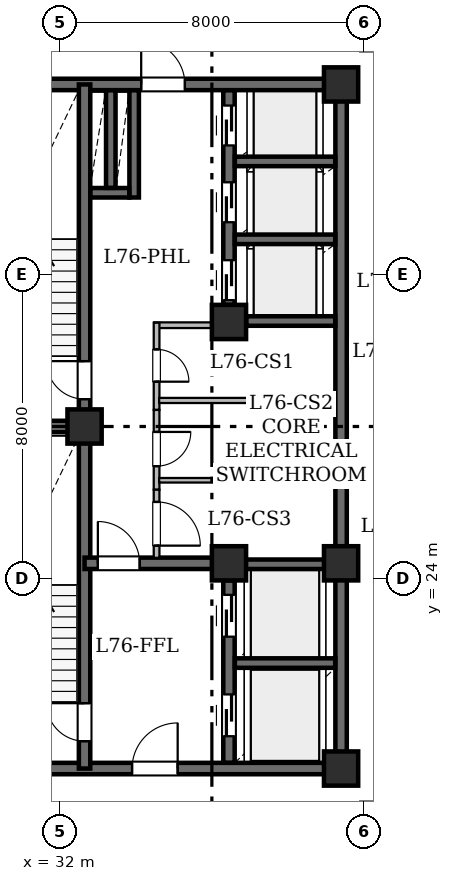
"""IFC4 building model, lengths in metres.
Left out: names, types, materials, properties, quantities, classifications, styles, units other than length and angle.
Written with IfcOpenShell. Run it as: python <this file> out.ifc"""

import sys

from ifc_helpers import new_model, si_unit, direction, frame, frame_2d, origin, origin_2d, place, context, subcontext, project, spatial, rectangle, hollow_rectangle, extrude, element, fill, save


model = new_model("IFC4")
c1 = context("Model", 3, precision=1e-05, world=origin(), true_north=direction((0.0, 1.0)))
c2 = subcontext(c1, "Body", "Model", "MODEL_VIEW")
j1 = project(units=[si_unit("LENGTHUNIT", "METRE"), si_unit("PLANEANGLEUNIT", "RADIAN")], contexts=[c1])
p1 = place(None, origin())
s1 = spatial("IfcSite", under=j1, at=p1, CompositionType="ELEMENT")
p2 = place(p1, origin())
s2 = spatial("IfcBuilding", under=s1, at=p2, CompositionType="ELEMENT")
p3 = place(p2, frame((0.0, 0.0, 298.85)))
s3 = spatial("IfcBuildingStorey", under=s2, at=p3, CompositionType="ELEMENT", Elevation=298.85)
for number, where, z_axis, x_axis in (
    (1, (32.65, 28.0, 0.0), (0.0, 0.0, 1.0), (1.0, 0.0, 0.0)),
    (2, (39.4, 19.0, 0.0), (0.0, 0.0, 1.0), (1.0, 0.0, 0.0)),
    (3, (36.45, 24.4, 0.0), (0.0, 0.0, 1.0), (1.0, 0.0, 0.0)),
    (4, (39.4, 24.4, 0.0), (0.0, 0.0, 1.0), (1.0, 0.0, 0.0)),
    (5, (36.45, 30.75, 0.0), (0.0, 0.0, 1.0), (1.0, 0.0, 0.0)),
    (6, (39.4, 37.0, 0.0), (0.0, 0.0, 1.0), (1.0, 0.0, 0.0)),
):
    element("IfcColumn", number, at=place(p3, frame(where, z_axis=z_axis, x_axis=x_axis)), inside=s3, PredefinedType="COLUMN", context=c2, shape_type="SweptSolid", body=[
        extrude(hollow_rectangle(XDim=0.9, YDim=0.9, WallThickness=0.045, at=origin_2d()), origin(), (0.0, 0.0, 1.0), 4.2),
    ])
p4 = place(p3, frame((29.0, 19.0, 0.0), z_axis=(0.0, 0.0, 1.0), x_axis=(1.0, 0.0, 0.0)))
e7 = element("IfcWall", 7, at=p4, inside=s3, PredefinedType="SHEAR", context=c2, shape_type="SweptSolid", body=[
    extrude(rectangle(XDim=10.4, YDim=0.3, at=frame_2d((5.2, 0.0))), origin(), (0.0, 0.0, 1.0), 3.88),
])
p5 = place(p4, frame((4.9, 0.0, 0.0)))
e8 = element("IfcOpeningElement", 8, at=p5, cuts=e7, PredefinedType="OPENING", context=c2, shape_type="SweptSolid", body=[
    extrude(rectangle(XDim=1.2, YDim=2.15, at=frame_2d((0.6, 1.075))), frame((0.0, 0.16, 0.0), z_axis=(0.0, -1.0, 0.0), x_axis=(1.0, 0.0, 0.0)), (0.0, 0.0, 1.0), 0.32),
])
p6 = place(p3, frame((29.0, 37.0, 0.0), z_axis=(0.0, 0.0, 1.0), x_axis=(1.0, 0.0, 0.0)))
e9 = element("IfcWall", 9, at=p6, inside=s3, PredefinedType="SHEAR", context=c2, shape_type="SweptSolid", body=[
    extrude(rectangle(XDim=10.4, YDim=0.3, at=frame_2d((5.2, 0.0))), origin(), (0.0, 0.0, 1.0), 3.88),
])
p7 = place(p6, frame((5.14, 0.0, 0.0)))
e10 = element("IfcOpeningElement", 10, at=p7, cuts=e9, PredefinedType="OPENING", context=c2, shape_type="SweptSolid", body=[
    extrude(rectangle(XDim=1.15, YDim=2.2, at=frame_2d((0.575, 1.1))), frame((0.0, 0.16, 0.0), z_axis=(0.0, -1.0, 0.0), x_axis=(1.0, 0.0, 0.0)), (0.0, 0.0, 1.0), 0.32),
])
p8 = place(p3, frame((39.4, 19.0, 0.0), z_axis=(0.0, 0.0, 1.0), x_axis=(0.0, 1.0, 0.0)))
e11 = element("IfcWall", 11, at=p8, inside=s3, PredefinedType="SHEAR", context=c2, shape_type="SweptSolid", body=[
    extrude(rectangle(XDim=5.4, YDim=0.3, at=frame_2d((2.7, 0.0))), origin(), (0.0, 0.0, 1.0), 3.88),
])
p9 = place(p3, frame((39.4, 24.4, 0.0), z_axis=(0.0, 0.0, 1.0), x_axis=(0.0, 1.0, 0.0)))
e12 = element("IfcWall", 12, at=p9, inside=s3, PredefinedType="SHEAR", context=c2, shape_type="SweptSolid", body=[
    extrude(rectangle(XDim=12.6, YDim=0.3, at=frame_2d((6.3, 0.0))), origin(), (0.0, 0.0, 1.0), 3.88),
])
p10 = place(p3, frame((32.65, 19.0, 0.0), z_axis=(0.0, 0.0, 1.0), x_axis=(0.0, 1.0, 0.0)))
e13 = element("IfcWall", 13, at=p10, inside=s3, PredefinedType="SHEAR", context=c2, shape_type="SweptSolid", body=[
    extrude(rectangle(XDim=9.0, YDim=0.3, at=frame_2d((4.5, 0.0))), origin(), (0.0, 0.0, 1.0), 3.88),
])
p11 = place(p10, frame((0.72, 0.0, 0.0)))
e14 = element("IfcOpeningElement", 14, at=p11, cuts=e13, PredefinedType="OPENING", context=c2, shape_type="SweptSolid", body=[
    extrude(rectangle(XDim=1.0, YDim=2.15, at=frame_2d((0.5, 1.075))), frame((0.0, 0.16, 0.0), z_axis=(0.0, -1.0, 0.0), x_axis=(1.0, 0.0, 0.0)), (0.0, 0.0, 1.0), 0.32),
])
p12 = place(p3, frame((32.65, 28.0, 0.0), z_axis=(0.0, 0.0, 1.0), x_axis=(0.0, 1.0, 0.0)))
e15 = element("IfcWall", 15, at=p12, inside=s3, PredefinedType="SHEAR", context=c2, shape_type="SweptSolid", body=[
    extrude(rectangle(XDim=9.0, YDim=0.3, at=frame_2d((4.5, 0.0))), origin(), (0.0, 0.0, 1.0), 3.88),
])
p13 = place(p12, frame((0.72, 0.0, 0.0)))
e16 = element("IfcOpeningElement", 16, at=p13, cuts=e15, PredefinedType="OPENING", context=c2, shape_type="SweptSolid", body=[
    extrude(rectangle(XDim=1.0, YDim=2.15, at=frame_2d((0.5, 1.075))), frame((0.0, 0.16, 0.0), z_axis=(0.0, -1.0, 0.0), x_axis=(1.0, 0.0, 0.0)), (0.0, 0.0, 1.0), 0.32),
])
p14 = place(p3, frame((29.0, 28.0, 0.0), z_axis=(0.0, 0.0, 1.0), x_axis=(1.0, 0.0, 0.0)))
e17 = element("IfcWall", 17, at=p14, inside=s3, PredefinedType="SHEAR", context=c2, shape_type="SweptSolid", body=[
    extrude(rectangle(XDim=3.65, YDim=0.3, at=frame_2d((1.825, 0.0))), origin(), (0.0, 0.0, 1.0), 3.88),
])
p15 = place(p3, frame((32.65, 24.4, 0.0), z_axis=(0.0, 0.0, 1.0), x_axis=(1.0, 0.0, 0.0)))
e18 = element("IfcWall", 18, at=p15, inside=s3, PredefinedType="SHEAR", context=c2, shape_type="SweptSolid", body=[
    extrude(rectangle(XDim=3.8, YDim=0.3, at=frame_2d((1.9, 0.0))), origin(), (0.0, 0.0, 1.0), 3.88),
])
p16 = place(p15, frame((0.35, 0.0, 0.0)))
e19 = element("IfcOpeningElement", 19, at=p16, cuts=e18, PredefinedType="OPENING", context=c2, shape_type="SweptSolid", body=[
    extrude(rectangle(XDim=1.1, YDim=2.15, at=frame_2d((0.55, 1.075))), frame((0.0, 0.16, 0.0), z_axis=(0.0, -1.0, 0.0), x_axis=(1.0, 0.0, 0.0)), (0.0, 0.0, 1.0), 0.32),
])
p17 = place(p3, frame((36.45, 19.154, 0.0), z_axis=(0.0, 0.0, 1.0), x_axis=(0.0, 1.0, 0.0)))
e20 = element("IfcWall", 20, at=p17, inside=s3, PredefinedType="SHEAR", context=c2, shape_type="SweptSolid", body=[
    extrude(rectangle(XDim=4.796, YDim=0.3, at=frame_2d((2.398, 0.0))), origin(), (0.0, 0.0, 1.0), 3.88),
])
p18 = place(p17, frame((0.696, 0.0, 0.0)))
e21 = element("IfcOpeningElement", 21, at=p18, cuts=e20, PredefinedType="OPENING", context=c2, shape_type="SweptSolid", body=[
    extrude(rectangle(XDim=1.1, YDim=2.15, at=frame_2d((0.55, 1.075))), frame((0.0, 0.16, 0.0), z_axis=(0.0, -1.0, 0.0), x_axis=(1.0, 0.0, 0.0)), (0.0, 0.0, 1.0), 0.32),
])
p19 = place(p17, frame((3.316, 0.0, 0.0)))
e22 = element("IfcOpeningElement", 22, at=p19, cuts=e20, PredefinedType="OPENING", context=c2, shape_type="SweptSolid", body=[
    extrude(rectangle(XDim=1.1, YDim=2.15, at=frame_2d((0.55, 1.075))), frame((0.0, 0.16, 0.0), z_axis=(0.0, -1.0, 0.0), x_axis=(1.0, 0.0, 0.0)), (0.0, 0.0, 1.0), 0.32),
])
p20 = place(p3, frame((36.45, 31.2, 0.0), z_axis=(0.0, 0.0, 1.0), x_axis=(0.0, 1.0, 0.0)))
e23 = element("IfcWall", 23, at=p20, inside=s3, PredefinedType="SHEAR", context=c2, shape_type="SweptSolid", body=[
    extrude(rectangle(XDim=5.646, YDim=0.3, at=frame_2d((2.823, 0.0))), origin(), (0.0, 0.0, 1.0), 3.88),
])
p21 = place(p20, frame((0.125, 0.0, 0.0)))
e24 = element("IfcOpeningElement", 24, at=p21, cuts=e23, PredefinedType="OPENING", context=c2, shape_type="SweptSolid", body=[
    extrude(rectangle(XDim=1.05, YDim=2.15, at=frame_2d((0.525, 1.075))), frame((0.0, 0.16, 0.0), z_axis=(0.0, -1.0, 0.0), x_axis=(1.0, 0.0, 0.0)), (0.0, 0.0, 1.0), 0.32),
])
p22 = place(p20, frame((2.175, 0.0, 0.0)))
e25 = element("IfcOpeningElement", 25, at=p22, cuts=e23, PredefinedType="OPENING", context=c2, shape_type="SweptSolid", body=[
    extrude(rectangle(XDim=1.05, YDim=2.15, at=frame_2d((0.525, 1.075))), frame((0.0, 0.16, 0.0), z_axis=(0.0, -1.0, 0.0), x_axis=(1.0, 0.0, 0.0)), (0.0, 0.0, 1.0), 0.32),
])
p23 = place(p20, frame((4.195, 0.0, 0.0)))
e26 = element("IfcOpeningElement", 26, at=p23, cuts=e23, PredefinedType="OPENING", context=c2, shape_type="SweptSolid", body=[
    extrude(rectangle(XDim=1.05, YDim=2.15, at=frame_2d((0.525, 1.075))), frame((0.0, 0.16, 0.0), z_axis=(0.0, -1.0, 0.0), x_axis=(1.0, 0.0, 0.0)), (0.0, 0.0, 1.0), 0.32),
])
for number, where, z_axis, x_axis in (
    (27, (36.604, 21.775, 0.0), (0.0, 0.0, 1.0), (1.0, 0.0, 0.0)),
    (28, (36.604, 24.375, 0.0), (0.0, 0.0, 1.0), (1.0, 0.0, 0.0)),
):
    element("IfcWall", number, at=place(p3, frame(where, z_axis=z_axis, x_axis=x_axis)), inside=s3, PredefinedType="SHEAR", context=c2, shape_type="SweptSolid", body=[
        extrude(rectangle(XDim=2.642, YDim=0.25, at=frame_2d((1.321, 0.0))), origin(), (0.0, 0.0, 1.0), 3.88),
    ])
p24 = place(p3, frame((36.904, 30.775, 0.0), z_axis=(0.0, 0.0, 1.0), x_axis=(1.0, 0.0, 0.0)))
e29 = element("IfcWall", 29, at=p24, inside=s3, PredefinedType="SHEAR", context=c2, shape_type="SweptSolid", body=[
    extrude(rectangle(XDim=2.342, YDim=0.25, at=frame_2d((1.171, 0.0))), origin(), (0.0, 0.0, 1.0), 3.88),
])
for number, where, z_axis, x_axis in (
    (30, (36.604, 32.925, 0.0), (0.0, 0.0, 1.0), (1.0, 0.0, 0.0)),
    (31, (36.604, 34.975, 0.0), (0.0, 0.0, 1.0), (1.0, 0.0, 0.0)),
):
    element("IfcWall", number, at=place(p3, frame(where, z_axis=z_axis, x_axis=x_axis)), inside=s3, PredefinedType="SHEAR", context=c2, shape_type="SweptSolid", body=[
        extrude(rectangle(XDim=2.642, YDim=0.25, at=frame_2d((1.321, 0.0))), origin(), (0.0, 0.0, 1.0), 3.88),
    ])
p25 = place(p3, frame((33.955, 34.025, 0.0), z_axis=(0.0, 0.0, 1.0), x_axis=(0.0, 1.0, 0.0)))
e32 = element("IfcWall", 32, at=p25, inside=s3, PredefinedType="SHEAR", context=c2, shape_type="SweptSolid", body=[
    extrude(rectangle(XDim=2.821, YDim=0.25, at=frame_2d((1.411, 0.0))), origin(), (0.0, 0.0, 1.0), 3.88),
])
p26 = place(p3, frame((32.804, 34.15, 0.0), z_axis=(0.0, 0.0, 1.0), x_axis=(1.0, 0.0, 0.0)))
e33 = element("IfcWall", 33, at=p26, inside=s3, PredefinedType="SHEAR", context=c2, shape_type="SweptSolid", body=[
    extrude(rectangle(XDim=1.022, YDim=0.25, at=frame_2d((0.511, 0.0))), origin(), (0.0, 0.0, 1.0), 3.88),
])
p27 = place(p3, frame((33.34, 34.279, 0.0), z_axis=(0.0, 0.0, 1.0), x_axis=(0.0, 1.0, 0.0)))
e34 = element("IfcWall", 34, at=p27, inside=s3, PredefinedType="SHEAR", context=c2, shape_type="SweptSolid", body=[
    extrude(rectangle(XDim=2.567, YDim=0.25, at=frame_2d((1.283, 0.0))), origin(), (0.0, 0.0, 1.0), 3.88),
])
p28 = place(p3, frame((36.3, 30.665, 0.0), z_axis=(0.0, 0.0, 1.0), x_axis=(-1.0, 0.0, 0.0)))
e35 = element("IfcWall", 35, at=p28, inside=s3, PredefinedType="STANDARD", context=c2, shape_type="SweptSolid", body=[
    extrude(rectangle(XDim=1.82, YDim=0.15, at=frame_2d((0.91, 0.0))), origin(), (0.0, 0.0, 1.0), 3.88),
])
p29 = place(p3, frame((34.545, 30.73, 0.0), z_axis=(0.0, 0.0, 1.0), x_axis=(0.0, -1.0, 0.0)))
e36 = element("IfcWall", 36, at=p29, inside=s3, PredefinedType="STANDARD", context=c2, shape_type="SweptSolid", body=[
    extrude(rectangle(XDim=2.294, YDim=0.15, at=frame_2d((1.147, 0.0))), origin(), (0.0, 0.0, 1.0), 3.88),
])
p30 = place(p29, frame((0.701, 0.0, 0.0)))
e37 = element("IfcOpeningElement", 37, at=p30, cuts=e36, PredefinedType="OPENING", context=c2, shape_type="SweptSolid", body=[
    extrude(rectangle(XDim=0.85, YDim=2.1, at=frame_2d((0.425, 1.05))), frame((0.0, 0.085, 0.0), z_axis=(0.0, -1.0, 0.0), x_axis=(1.0, 0.0, 0.0)), (0.0, 0.0, 1.0), 0.17),
])
p31 = place(p3, frame((34.545, 28.436, 0.0), z_axis=(0.0, 0.0, 1.0), x_axis=(0.0, -1.0, 0.0)))
e38 = element("IfcWall", 38, at=p31, inside=s3, PredefinedType="STANDARD", context=c2, shape_type="SweptSolid", body=[
    extrude(rectangle(XDim=2.1, YDim=0.15, at=frame_2d((1.05, 0.0))), origin(), (0.0, 0.0, 1.0), 3.88),
])
p32 = place(p31, frame((0.579, 0.0, 0.0)))
e39 = element("IfcOpeningElement", 39, at=p32, cuts=e38, PredefinedType="OPENING", context=c2, shape_type="SweptSolid", body=[
    extrude(rectangle(XDim=0.9, YDim=2.1, at=frame_2d((0.45, 1.05))), frame((0.0, 0.085, 0.0), z_axis=(0.0, -1.0, 0.0), x_axis=(1.0, 0.0, 0.0)), (0.0, 0.0, 1.0), 0.17),
])
p33 = place(p3, frame((34.545, 26.336, 0.0), z_axis=(0.0, 0.0, 1.0), x_axis=(0.0, -1.0, 0.0)))
e40 = element("IfcWall", 40, at=p33, inside=s3, PredefinedType="STANDARD", context=c2, shape_type="SweptSolid", body=[
    extrude(rectangle(XDim=1.792, YDim=0.15, at=frame_2d((0.896, 0.0))), origin(), (0.0, 0.0, 1.0), 3.88),
])
p34 = place(p33, frame((0.321, 0.0, 0.0)))
e41 = element("IfcOpeningElement", 41, at=p34, cuts=e40, PredefinedType="OPENING", context=c2, shape_type="SweptSolid", body=[
    extrude(rectangle(XDim=1.15, YDim=2.2, at=frame_2d((0.575, 1.1))), frame((0.0, 0.085, 0.0), z_axis=(0.0, -1.0, 0.0), x_axis=(1.0, 0.0, 0.0)), (0.0, 0.0, 1.0), 0.17),
])
p35 = place(p3, frame((39.256, 28.685, 0.0), z_axis=(0.0, 0.0, 1.0), x_axis=(-1.0, 0.0, 0.0)))
e42 = element("IfcWall", 42, at=p35, inside=s3, PredefinedType="PARTITIONING", context=c2, shape_type="SweptSolid", body=[
    extrude(rectangle(XDim=4.644, YDim=0.135, at=frame_2d((2.322, 0.0))), origin(), (0.0, 0.0, 1.0), 3.88),
])
p36 = place(p3, frame((39.256, 26.585, 0.0), z_axis=(0.0, 0.0, 1.0), x_axis=(-1.0, 0.0, 0.0)))
e43 = element("IfcWall", 43, at=p36, inside=s3, PredefinedType="PARTITIONING", context=c2, shape_type="SweptSolid", body=[
    extrude(rectangle(XDim=4.644, YDim=0.12, at=frame_2d((2.322, 0.0))), origin(), (0.0, 0.0, 1.0), 3.88),
])
p37 = place(p11, origin())
e44 = element("IfcDoor", 44, at=p37, inside=s3, OperationType="SINGLE_SWING_RIGHT", PredefinedType="DOOR", context=c2, shape_type="SweptSolid", body=[
    extrude(rectangle(XDim=1.0, YDim=2.15, at=frame_2d((0.5, 1.075))), frame((0.0, 0.025, 0.0), z_axis=(0.0, -1.0, 0.0), x_axis=(1.0, 0.0, 0.0)), (0.0, 0.0, 1.0), 0.05),
])
fill(e14, e44)
p38 = place(p13, origin())
e45 = element("IfcDoor", 45, at=p38, inside=s3, OperationType="SINGLE_SWING_RIGHT", PredefinedType="DOOR", context=c2, shape_type="SweptSolid", body=[
    extrude(rectangle(XDim=1.0, YDim=2.15, at=frame_2d((0.5, 1.075))), frame((0.0, 0.025, 0.0), z_axis=(0.0, -1.0, 0.0), x_axis=(1.0, 0.0, 0.0)), (0.0, 0.0, 1.0), 0.05),
])
fill(e16, e45)
p39 = place(p16, origin())
e46 = element("IfcDoor", 46, at=p39, inside=s3, OperationType="SINGLE_SWING_LEFT", PredefinedType="DOOR", context=c2, shape_type="SweptSolid", body=[
    extrude(rectangle(XDim=1.1, YDim=2.15, at=frame_2d((0.55, 1.075))), frame((0.0, 0.025, 0.0), z_axis=(0.0, -1.0, 0.0), x_axis=(1.0, 0.0, 0.0)), (0.0, 0.0, 1.0), 0.05),
])
fill(e19, e46)
p40 = place(p5, origin())
e47 = element("IfcDoor", 47, at=p40, inside=s3, OperationType="SINGLE_SWING_RIGHT", PredefinedType="DOOR", context=c2, shape_type="SweptSolid", body=[
    extrude(rectangle(XDim=1.2, YDim=2.15, at=frame_2d((0.6, 1.075))), frame((0.0, 0.025, 0.0), z_axis=(0.0, -1.0, 0.0), x_axis=(1.0, 0.0, 0.0)), (0.0, 0.0, 1.0), 0.05),
])
fill(e8, e47)
p41 = place(p7, origin())
e48 = element("IfcDoor", 48, at=p41, inside=s3, OperationType="SINGLE_SWING_LEFT", PredefinedType="DOOR", context=c2, shape_type="SweptSolid", body=[
    extrude(rectangle(XDim=1.15, YDim=2.2, at=frame_2d((0.575, 1.1))), frame((0.0, 0.025, 0.0), z_axis=(0.0, -1.0, 0.0), x_axis=(1.0, 0.0, 0.0)), (0.0, 0.0, 1.0), 0.05),
])
fill(e10, e48)
p42 = place(p18, origin())
e49 = element("IfcDoor", 49, at=p42, inside=s3, OperationType="SLIDING_TO_LEFT", PredefinedType="DOOR", context=c2, shape_type="SweptSolid", body=[
    extrude(rectangle(XDim=1.1, YDim=2.15, at=frame_2d((0.55, 1.075))), frame((0.0, 0.025, 0.0), z_axis=(0.0, -1.0, 0.0), x_axis=(1.0, 0.0, 0.0)), (0.0, 0.0, 1.0), 0.05),
])
fill(e21, e49)
p43 = place(p19, origin())
e50 = element("IfcDoor", 50, at=p43, inside=s3, OperationType="SLIDING_TO_LEFT", PredefinedType="DOOR", context=c2, shape_type="SweptSolid", body=[
    extrude(rectangle(XDim=1.1, YDim=2.15, at=frame_2d((0.55, 1.075))), frame((0.0, 0.025, 0.0), z_axis=(0.0, -1.0, 0.0), x_axis=(1.0, 0.0, 0.0)), (0.0, 0.0, 1.0), 0.05),
])
fill(e22, e50)
p44 = place(p21, origin())
e51 = element("IfcDoor", 51, at=p44, inside=s3, OperationType="SLIDING_TO_LEFT", PredefinedType="DOOR", context=c2, shape_type="SweptSolid", body=[
    extrude(rectangle(XDim=1.05, YDim=2.15, at=frame_2d((0.525, 1.075))), frame((0.0, 0.025, 0.0), z_axis=(0.0, -1.0, 0.0), x_axis=(1.0, 0.0, 0.0)), (0.0, 0.0, 1.0), 0.05),
])
fill(e24, e51)
p45 = place(p22, origin())
e52 = element("IfcDoor", 52, at=p45, inside=s3, OperationType="SLIDING_TO_LEFT", PredefinedType="DOOR", context=c2, shape_type="SweptSolid", body=[
    extrude(rectangle(XDim=1.05, YDim=2.15, at=frame_2d((0.525, 1.075))), frame((0.0, 0.025, 0.0), z_axis=(0.0, -1.0, 0.0), x_axis=(1.0, 0.0, 0.0)), (0.0, 0.0, 1.0), 0.05),
])
fill(e25, e52)
p46 = place(p23, origin())
e53 = element("IfcDoor", 53, at=p46, inside=s3, OperationType="SLIDING_TO_LEFT", PredefinedType="DOOR", context=c2, shape_type="SweptSolid", body=[
    extrude(rectangle(XDim=1.05, YDim=2.15, at=frame_2d((0.525, 1.075))), frame((0.0, 0.025, 0.0), z_axis=(0.0, -1.0, 0.0), x_axis=(1.0, 0.0, 0.0)), (0.0, 0.0, 1.0), 0.05),
])
fill(e26, e53)
p47 = place(p30, origin())
e54 = element("IfcDoor", 54, at=p47, inside=s3, OperationType="SINGLE_SWING_RIGHT", PredefinedType="DOOR", context=c2, shape_type="SweptSolid", body=[
    extrude(rectangle(XDim=0.85, YDim=2.1, at=frame_2d((0.425, 1.05))), frame((0.0, 0.025, 0.0), z_axis=(0.0, -1.0, 0.0), x_axis=(1.0, 0.0, 0.0)), (0.0, 0.0, 1.0), 0.05),
])
fill(e37, e54)
p48 = place(p32, origin())
e55 = element("IfcDoor", 55, at=p48, inside=s3, OperationType="SINGLE_SWING_LEFT", PredefinedType="DOOR", context=c2, shape_type="SweptSolid", body=[
    extrude(rectangle(XDim=0.9, YDim=2.1, at=frame_2d((0.45, 1.05))), frame((0.0, 0.025, 0.0), z_axis=(0.0, -1.0, 0.0), x_axis=(1.0, 0.0, 0.0)), (0.0, 0.0, 1.0), 0.05),
])
fill(e39, e55)
p49 = place(p34, origin())
e56 = element("IfcDoor", 56, at=p49, inside=s3, OperationType="SINGLE_SWING_RIGHT", PredefinedType="DOOR", context=c2, shape_type="SweptSolid", body=[
    extrude(rectangle(XDim=1.15, YDim=2.2, at=frame_2d((0.575, 1.1))), frame((0.0, 0.025, 0.0), z_axis=(0.0, -1.0, 0.0), x_axis=(1.0, 0.0, 0.0)), (0.0, 0.0, 1.0), 0.05),
])
fill(e41, e56)
save(model, sys.argv[1])
